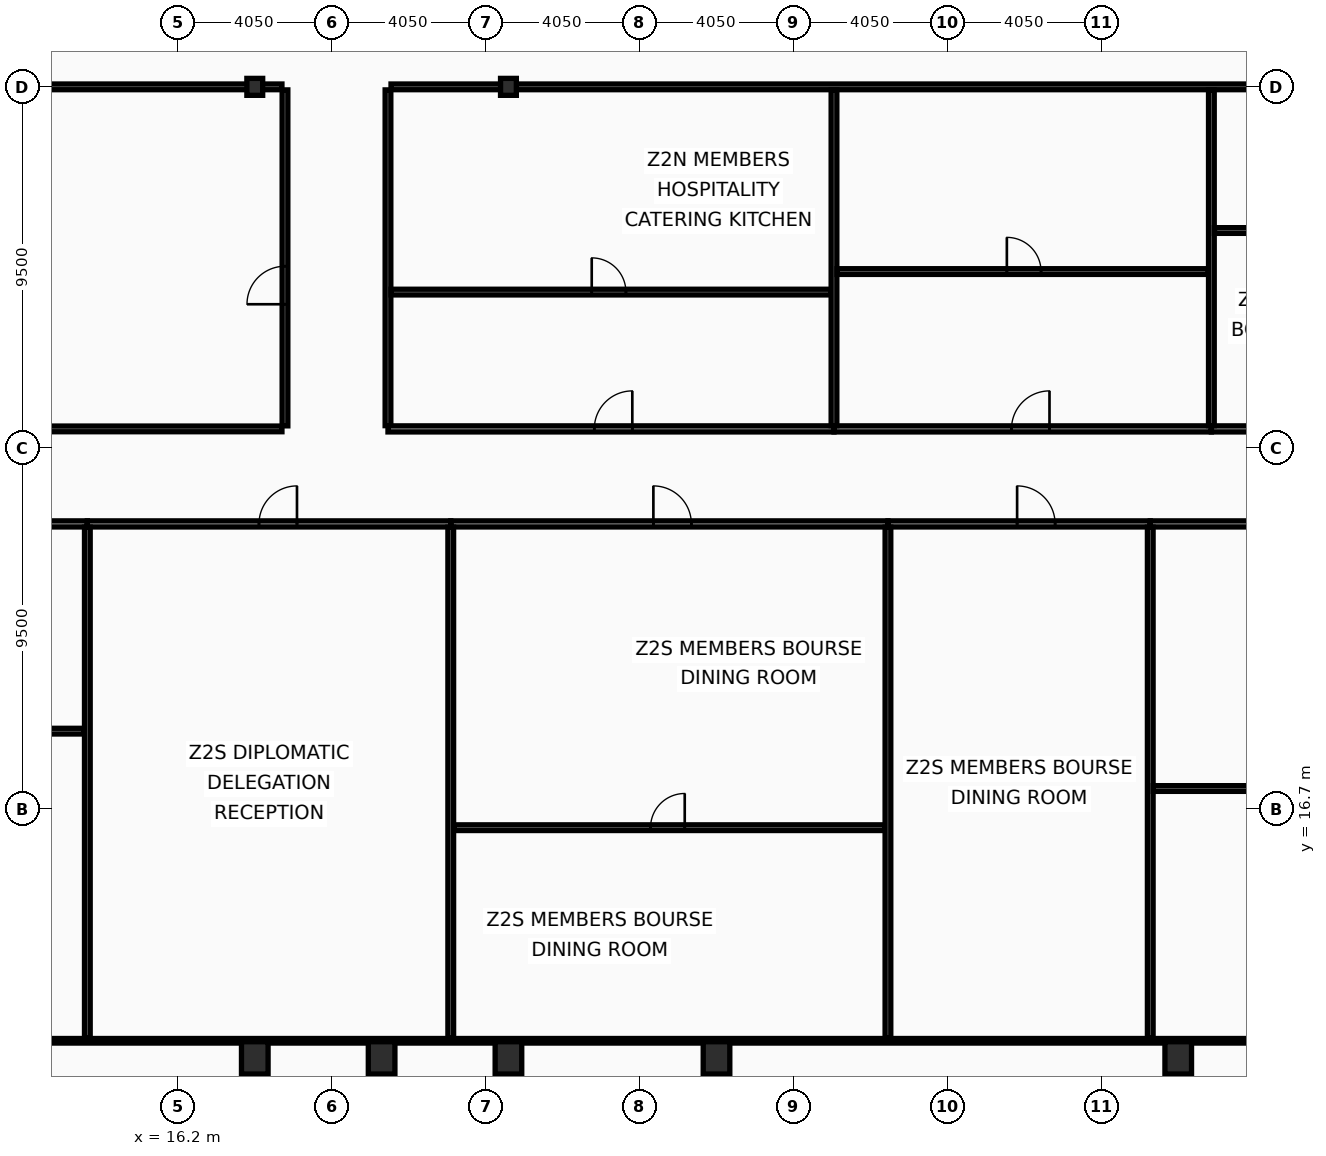
"""IFC4 building model, lengths in metres.
Left out: names, types, materials, properties, quantities, classifications, styles, units other than length and angle.
Written with IfcOpenShell. Run it as: python <this file> out.ifc"""

import sys

from ifc_helpers import new_model, si_unit, direction, frame, frame_2d, origin, origin_2d, place, context, subcontext, project, spatial, rectangle, hollow_rectangle, i_section, extrude, element, fill, save


model = new_model("IFC4")
c1 = context("Model", 3, precision=1e-05, world=origin(), true_north=direction((0.0, 1.0)))
c2 = subcontext(c1, "Body", "Model", "MODEL_VIEW")
j1 = project(units=[si_unit("LENGTHUNIT", "METRE"), si_unit("PLANEANGLEUNIT", "RADIAN")], contexts=[c1])
p1 = place(None, origin())
s1 = spatial("IfcSite", under=j1, at=p1, CompositionType="ELEMENT")
p2 = place(p1, origin())
s2 = spatial("IfcBuilding", under=s1, at=p2, CompositionType="ELEMENT")
p3 = place(p2, frame((0.0, 0.0, 136.2)))
s3 = spatial("IfcBuildingStorey", under=s2, at=p3, CompositionType="ELEMENT", Elevation=136.2)
for number, where, z_axis, x_axis in (
    (1, (18.225, 10.15, 0.0), (0.0, 0.0, 1.0), (1.0, 0.0, 0.0)),
    (2, (21.562, 10.15, 0.0), (0.0, 0.0, 1.0), (1.0, 0.0, 0.0)),
    (3, (24.9, 10.15, 0.0), (0.0, 0.0, 1.0), (1.0, 0.0, 0.0)),
    (4, (30.375, 10.15, 0.0), (0.0, 0.0, 1.0), (1.0, 0.0, 0.0)),
    (5, (42.525, 10.15, 0.0), (0.0, 0.0, 1.0), (1.0, 0.0, 0.0)),
):
    element("IfcColumn", number, at=place(p3, frame(where, z_axis=z_axis, x_axis=x_axis)), inside=s3, PredefinedType="COLUMN", context=c2, shape_type="SweptSolid", body=[
        extrude(hollow_rectangle(XDim=0.7, YDim=0.85, WallThickness=0.05, at=origin_2d()), origin(), (0.0, 0.0, 1.0), 3.6),
    ])
for number, where, z_axis, x_axis in (
    (6, (18.225, 35.7, 0.0), (0.0, 0.0, 1.0), (1.0, 0.0, 0.0)),
    (7, (24.9, 35.7, 0.0), (0.0, 0.0, 1.0), (1.0, 0.0, 0.0)),
):
    element("IfcColumn", number, at=place(p3, frame(where, z_axis=z_axis, x_axis=x_axis)), inside=s3, PredefinedType="COLUMN", context=c2, shape_type="SweptSolid", body=[
        extrude(i_section(OverallWidth=0.416, OverallDepth=0.446, WebThickness=0.039, FlangeThickness=0.063, at=origin_2d()), origin(), (0.0, 0.0, 1.0), 3.6),
    ])
p4 = place(p3, frame((6.03, 24.2, 0.0), z_axis=(0.0, 0.0, 1.0), x_axis=(1.0, 0.0, 0.0)))
e8 = element("IfcWall", 8, at=p4, inside=s3, PredefinedType="PARTITIONING", context=c2, shape_type="SweptSolid", body=[
    extrude(rectangle(XDim=7.789, YDim=0.16, at=frame_2d((3.895, 0.0))), origin(), (0.0, 0.0, 1.0), 3.44),
])
p5 = place(p4, frame((3.771, 0.0, 0.0)))
e9 = element("IfcOpeningElement", 9, at=p5, cuts=e8, PredefinedType="OPENING", context=c2, shape_type="SweptSolid", body=[
    extrude(rectangle(XDim=1.0, YDim=2.05, at=frame_2d((0.5, 1.025))), frame((0.0, 0.09, 0.0), z_axis=(0.0, -1.0, 0.0), x_axis=(1.0, 0.0, 0.0)), (0.0, 0.0, 1.0), 0.18),
])
p6 = place(p3, frame((6.095, 18.747, 0.0), z_axis=(0.0, 0.0, 1.0), x_axis=(1.0, 0.0, 0.0)))
e10 = element("IfcWall", 10, at=p6, inside=s3, PredefinedType="PARTITIONING", context=c2, shape_type="SweptSolid", body=[
    extrude(rectangle(XDim=7.644, YDim=0.15, at=frame_2d((3.822, 0.0))), origin(), (0.0, 0.0, 1.0), 2.73),
])
p7 = place(p6, frame((3.505, 0.0, 0.0)))
e11 = element("IfcOpeningElement", 11, at=p7, cuts=e10, PredefinedType="OPENING", context=c2, shape_type="SweptSolid", body=[
    extrude(rectangle(XDim=0.9, YDim=2.05, at=frame_2d((0.45, 1.025))), frame((0.0, 0.085, 0.0), z_axis=(0.0, -1.0, 0.0), x_axis=(1.0, 0.0, 0.0)), (0.0, 0.0, 1.0), 0.17),
])
p8 = place(p3, frame((13.819, 24.2, 0.0), z_axis=(0.0, 0.0, 1.0), x_axis=(1.0, 0.0, 0.0)))
e12 = element("IfcWall", 12, at=p8, inside=s3, PredefinedType="PARTITIONING", context=c2, shape_type="SweptSolid", body=[
    extrude(rectangle(XDim=9.563, YDim=0.16, at=frame_2d((4.781, 0.0))), origin(), (0.0, 0.0, 1.0), 2.73),
])
p9 = place(p8, frame((4.516, 0.0, 0.0)))
e13 = element("IfcOpeningElement", 13, at=p9, cuts=e12, PredefinedType="OPENING", context=c2, shape_type="SweptSolid", body=[
    extrude(rectangle(XDim=1.0, YDim=2.05, at=frame_2d((0.5, 1.025))), frame((0.0, 0.09, 0.0), z_axis=(0.0, -1.0, 0.0), x_axis=(1.0, 0.0, 0.0)), (0.0, 0.0, 1.0), 0.18),
])
p10 = place(p3, frame((13.819, 10.665, 0.0), z_axis=(0.0, 0.0, 1.0), x_axis=(0.0, 1.0, 0.0)))
e14 = element("IfcWall", 14, at=p10, inside=s3, PredefinedType="PARTITIONING", context=c2, shape_type="SweptSolid", body=[
    extrude(rectangle(XDim=13.45, YDim=0.15, at=frame_2d((6.725, 0.0))), origin(), (0.0, 0.0, 1.0), 2.73),
])
p11 = place(p3, frame((23.382, 24.2, 0.0), z_axis=(0.0, 0.0, 1.0), x_axis=(1.0, 0.0, 0.0)))
e15 = element("IfcWall", 15, at=p11, inside=s3, PredefinedType="PARTITIONING", context=c2, shape_type="SweptSolid", body=[
    extrude(rectangle(XDim=11.504, YDim=0.16, at=frame_2d((5.752, 0.0))), origin(), (0.0, 0.0, 1.0), 2.73),
])
p12 = place(p11, frame((5.332, 0.0, 0.0)))
e16 = element("IfcOpeningElement", 16, at=p12, cuts=e15, PredefinedType="OPENING", context=c2, shape_type="SweptSolid", body=[
    extrude(rectangle(XDim=1.0, YDim=2.05, at=frame_2d((0.5, 1.025))), frame((0.0, 0.09, 0.0), z_axis=(0.0, -1.0, 0.0), x_axis=(1.0, 0.0, 0.0)), (0.0, 0.0, 1.0), 0.18),
])
p13 = place(p3, frame((23.382, 10.665, 0.0), z_axis=(0.0, 0.0, 1.0), x_axis=(0.0, 1.0, 0.0)))
e17 = element("IfcWall", 17, at=p13, inside=s3, PredefinedType="PARTITIONING", context=c2, shape_type="SweptSolid", body=[
    extrude(rectangle(XDim=13.45, YDim=0.15, at=frame_2d((6.725, 0.0))), origin(), (0.0, 0.0, 1.0), 2.93),
])
p14 = place(p3, frame((23.462, 16.207, 0.0), z_axis=(0.0, 0.0, 1.0), x_axis=(1.0, 0.0, 0.0)))
e18 = element("IfcWall", 18, at=p14, inside=s3, PredefinedType="PARTITIONING", context=c2, shape_type="SweptSolid", body=[
    extrude(rectangle(XDim=11.344, YDim=0.15, at=frame_2d((5.672, 0.0))), origin(), (0.0, 0.0, 1.0), 2.73),
])
p15 = place(p14, frame((5.177, 0.0, 0.0)))
e19 = element("IfcOpeningElement", 19, at=p15, cuts=e18, PredefinedType="OPENING", context=c2, shape_type="SweptSolid", body=[
    extrude(rectangle(XDim=0.9, YDim=2.05, at=frame_2d((0.45, 1.025))), frame((0.0, 0.085, 0.0), z_axis=(0.0, -1.0, 0.0), x_axis=(1.0, 0.0, 0.0)), (0.0, 0.0, 1.0), 0.17),
])
p16 = place(p3, frame((34.886, 24.2, 0.0), z_axis=(0.0, 0.0, 1.0), x_axis=(1.0, 0.0, 0.0)))
e20 = element("IfcWall", 20, at=p16, inside=s3, PredefinedType="PARTITIONING", context=c2, shape_type="SweptSolid", body=[
    extrude(rectangle(XDim=6.902, YDim=0.16, at=frame_2d((3.451, 0.0))), origin(), (0.0, 0.0, 1.0), 3.44),
])
p17 = place(p16, frame((3.399, 0.0, 0.0)))
e21 = element("IfcOpeningElement", 21, at=p17, cuts=e20, PredefinedType="OPENING", context=c2, shape_type="SweptSolid", body=[
    extrude(rectangle(XDim=1.0, YDim=2.05, at=frame_2d((0.5, 1.025))), frame((0.0, 0.09, 0.0), z_axis=(0.0, -1.0, 0.0), x_axis=(1.0, 0.0, 0.0)), (0.0, 0.0, 1.0), 0.18),
])
p18 = place(p3, frame((34.886, 10.665, 0.0), z_axis=(0.0, 0.0, 1.0), x_axis=(0.0, 1.0, 0.0)))
e22 = element("IfcWall", 22, at=p18, inside=s3, PredefinedType="PARTITIONING", context=c2, shape_type="SweptSolid", body=[
    extrude(rectangle(XDim=13.45, YDim=0.15, at=frame_2d((6.725, 0.0))), origin(), (0.0, 0.0, 1.0), 2.93),
])
p19 = place(p3, frame((41.789, 24.2, 0.0), z_axis=(0.0, 0.0, 1.0), x_axis=(1.0, 0.0, 0.0)))
e23 = element("IfcWall", 23, at=p19, inside=s3, PredefinedType="PARTITIONING", context=c2, shape_type="SweptSolid", body=[
    extrude(rectangle(XDim=7.214, YDim=0.16, at=frame_2d((3.607, 0.0))), origin(), (0.0, 0.0, 1.0), 2.73),
])
p20 = place(p19, frame((3.53, 0.0, 0.0)))
e24 = element("IfcOpeningElement", 24, at=p20, cuts=e23, PredefinedType="OPENING", context=c2, shape_type="SweptSolid", body=[
    extrude(rectangle(XDim=1.0, YDim=2.05, at=frame_2d((0.5, 1.025))), frame((0.0, 0.09, 0.0), z_axis=(0.0, -1.0, 0.0), x_axis=(1.0, 0.0, 0.0)), (0.0, 0.0, 1.0), 0.18),
])
p21 = place(p3, frame((41.789, 10.665, 0.0), z_axis=(0.0, 0.0, 1.0), x_axis=(0.0, 1.0, 0.0)))
e25 = element("IfcWall", 25, at=p21, inside=s3, PredefinedType="PARTITIONING", context=c2, shape_type="SweptSolid", body=[
    extrude(rectangle(XDim=13.45, YDim=0.15, at=frame_2d((6.725, 0.0))), origin(), (0.0, 0.0, 1.0), 2.93),
])
p22 = place(p3, frame((41.869, 17.238, 0.0), z_axis=(0.0, 0.0, 1.0), x_axis=(1.0, 0.0, 0.0)))
e26 = element("IfcWall", 26, at=p22, inside=s3, PredefinedType="PARTITIONING", context=c2, shape_type="SweptSolid", body=[
    extrude(rectangle(XDim=7.054, YDim=0.15, at=frame_2d((3.527, 0.0))), origin(), (0.0, 0.0, 1.0), 2.73),
])
p23 = place(p22, frame((3.246, 0.0, 0.0)))
e27 = element("IfcOpeningElement", 27, at=p23, cuts=e26, PredefinedType="OPENING", context=c2, shape_type="SweptSolid", body=[
    extrude(rectangle(XDim=0.9, YDim=2.05, at=frame_2d((0.45, 1.025))), frame((0.0, 0.085, 0.0), z_axis=(0.0, -1.0, 0.0), x_axis=(1.0, 0.0, 0.0)), (0.0, 0.0, 1.0), 0.17),
])
p24 = place(p3, frame((19.02, 26.78, 0.0), z_axis=(0.0, 0.0, 1.0), x_axis=(0.0, 1.0, 0.0)))
e28 = element("IfcWall", 28, at=p24, inside=s3, PredefinedType="PARTITIONING", context=c2, shape_type="SweptSolid", body=[
    extrude(rectangle(XDim=8.84, YDim=0.15, at=frame_2d((4.42, 0.0))), origin(), (0.0, 0.0, 1.0), 2.93),
])
p25 = place(p24, frame((3.2, 0.0, 0.0)))
e29 = element("IfcOpeningElement", 29, at=p25, cuts=e28, PredefinedType="OPENING", context=c2, shape_type="SweptSolid", body=[
    extrude(rectangle(XDim=1.0, YDim=2.05, at=frame_2d((0.5, 1.025))), frame((0.0, 0.085, 0.0), z_axis=(0.0, -1.0, 0.0), x_axis=(1.0, 0.0, 0.0)), (0.0, 0.0, 1.0), 0.17),
])
for number, where, z_axis, x_axis in (
    (30, (6.095, 26.7, 0.0), (0.0, 0.0, 1.0), (1.0, 0.0, 0.0)),
    (31, (6.095, 35.7, 0.0), (0.0, 0.0, 1.0), (1.0, 0.0, 0.0)),
):
    element("IfcWall", number, at=place(p3, frame(where, z_axis=z_axis, x_axis=x_axis)), inside=s3, PredefinedType="PARTITIONING", context=c2, shape_type="SweptSolid", body=[
        extrude(rectangle(XDim=12.845, YDim=0.15, at=frame_2d((6.422, 0.0))), origin(), (0.0, 0.0, 1.0), 2.73),
    ])
p26 = place(p3, frame((21.73, 26.785, 0.0), z_axis=(0.0, 0.0, 1.0), x_axis=(0.0, 1.0, 0.0)))
e32 = element("IfcWall", 32, at=p26, inside=s3, PredefinedType="PARTITIONING", context=c2, shape_type="SweptSolid", body=[
    extrude(rectangle(XDim=8.835, YDim=0.15, at=frame_2d((4.417, 0.0))), origin(), (0.0, 0.0, 1.0), 2.93),
])
p27 = place(p3, frame((21.81, 35.7, 0.0), z_axis=(0.0, 0.0, 1.0), x_axis=(1.0, 0.0, 0.0)))
e33 = element("IfcWall", 33, at=p27, inside=s3, PredefinedType="PARTITIONING", context=c2, shape_type="SweptSolid", body=[
    extrude(rectangle(XDim=44.995, YDim=0.15, at=frame_2d((22.498, 0.0))), origin(), (0.0, 0.0, 1.0), 2.73),
])
p28 = place(p3, frame((21.73, 26.7, 0.0), z_axis=(0.0, 0.0, 1.0), x_axis=(1.0, 0.0, 0.0)))
e34 = element("IfcWall", 34, at=p28, inside=s3, PredefinedType="PARTITIONING", context=c2, shape_type="SweptSolid", body=[
    extrude(rectangle(XDim=11.736, YDim=0.16, at=frame_2d((5.868, 0.0))), origin(), (0.0, 0.0, 1.0), 2.73),
])
p29 = place(p28, frame((5.429, 0.0, 0.0)))
e35 = element("IfcOpeningElement", 35, at=p29, cuts=e34, PredefinedType="OPENING", context=c2, shape_type="SweptSolid", body=[
    extrude(rectangle(XDim=1.0, YDim=2.05, at=frame_2d((0.5, 1.025))), frame((0.0, 0.09, 0.0), z_axis=(0.0, -1.0, 0.0), x_axis=(1.0, 0.0, 0.0)), (0.0, 0.0, 1.0), 0.18),
])
p30 = place(p3, frame((21.81, 30.3, 0.0), z_axis=(0.0, 0.0, 1.0), x_axis=(1.0, 0.0, 0.0)))
e36 = element("IfcWall", 36, at=p30, inside=s3, PredefinedType="PARTITIONING", context=c2, shape_type="SweptSolid", body=[
    extrude(rectangle(XDim=11.576, YDim=0.15, at=frame_2d((5.788, 0.0))), origin(), (0.0, 0.0, 1.0), 2.73),
])
p31 = place(p30, frame((5.281, 0.0, 0.0)))
e37 = element("IfcOpeningElement", 37, at=p31, cuts=e36, PredefinedType="OPENING", context=c2, shape_type="SweptSolid", body=[
    extrude(rectangle(XDim=0.9, YDim=2.05, at=frame_2d((0.45, 1.025))), frame((0.0, 0.085, 0.0), z_axis=(0.0, -1.0, 0.0), x_axis=(1.0, 0.0, 0.0)), (0.0, 0.0, 1.0), 0.17),
])
p32 = place(p3, frame((33.466, 26.7, 0.0), z_axis=(0.0, 0.0, 1.0), x_axis=(1.0, 0.0, 0.0)))
e38 = element("IfcWall", 38, at=p32, inside=s3, PredefinedType="PARTITIONING", context=c2, shape_type="SweptSolid", body=[
    extrude(rectangle(XDim=9.931, YDim=0.16, at=frame_2d((4.965, 0.0))), origin(), (0.0, 0.0, 1.0), 2.73),
])
p33 = place(p32, frame((4.671, 0.0, 0.0)))
e39 = element("IfcOpeningElement", 39, at=p33, cuts=e38, PredefinedType="OPENING", context=c2, shape_type="SweptSolid", body=[
    extrude(rectangle(XDim=1.0, YDim=2.05, at=frame_2d((0.5, 1.025))), frame((0.0, 0.09, 0.0), z_axis=(0.0, -1.0, 0.0), x_axis=(1.0, 0.0, 0.0)), (0.0, 0.0, 1.0), 0.18),
])
p34 = place(p3, frame((33.466, 26.785, 0.0), z_axis=(0.0, 0.0, 1.0), x_axis=(0.0, 1.0, 0.0)))
e40 = element("IfcWall", 40, at=p34, inside=s3, PredefinedType="PARTITIONING", context=c2, shape_type="SweptSolid", body=[
    extrude(rectangle(XDim=8.835, YDim=0.15, at=frame_2d((4.417, 0.0))), origin(), (0.0, 0.0, 1.0), 2.93),
])
p35 = place(p3, frame((33.546, 30.84, 0.0), z_axis=(0.0, 0.0, 1.0), x_axis=(1.0, 0.0, 0.0)))
e41 = element("IfcWall", 41, at=p35, inside=s3, PredefinedType="PARTITIONING", context=c2, shape_type="SweptSolid", body=[
    extrude(rectangle(XDim=9.771, YDim=0.15, at=frame_2d((4.885, 0.0))), origin(), (0.0, 0.0, 1.0), 2.73),
])
p36 = place(p35, frame((4.469, 0.0, 0.0)))
e42 = element("IfcOpeningElement", 42, at=p36, cuts=e41, PredefinedType="OPENING", context=c2, shape_type="SweptSolid", body=[
    extrude(rectangle(XDim=0.9, YDim=2.05, at=frame_2d((0.45, 1.025))), frame((0.0, 0.085, 0.0), z_axis=(0.0, -1.0, 0.0), x_axis=(1.0, 0.0, 0.0)), (0.0, 0.0, 1.0), 0.17),
])
p37 = place(p3, frame((43.397, 26.7, 0.0), z_axis=(0.0, 0.0, 1.0), x_axis=(1.0, 0.0, 0.0)))
e43 = element("IfcWall", 43, at=p37, inside=s3, PredefinedType="PARTITIONING", context=c2, shape_type="SweptSolid", body=[
    extrude(rectangle(XDim=10.833, YDim=0.16, at=frame_2d((5.417, 0.0))), origin(), (0.0, 0.0, 1.0), 2.73),
])
p38 = place(p37, frame((5.05, 0.0, 0.0)))
e44 = element("IfcOpeningElement", 44, at=p38, cuts=e43, PredefinedType="OPENING", context=c2, shape_type="SweptSolid", body=[
    extrude(rectangle(XDim=1.0, YDim=2.05, at=frame_2d((0.5, 1.025))), frame((0.0, 0.09, 0.0), z_axis=(0.0, -1.0, 0.0), x_axis=(1.0, 0.0, 0.0)), (0.0, 0.0, 1.0), 0.18),
])
p39 = place(p3, frame((43.397, 26.785, 0.0), z_axis=(0.0, 0.0, 1.0), x_axis=(0.0, 1.0, 0.0)))
e45 = element("IfcWall", 45, at=p39, inside=s3, PredefinedType="PARTITIONING", context=c2, shape_type="SweptSolid", body=[
    extrude(rectangle(XDim=8.835, YDim=0.15, at=frame_2d((4.417, 0.0))), origin(), (0.0, 0.0, 1.0), 2.93),
])
p40 = place(p3, frame((43.477, 31.92, 0.0), z_axis=(0.0, 0.0, 1.0), x_axis=(1.0, 0.0, 0.0)))
e46 = element("IfcWall", 46, at=p40, inside=s3, PredefinedType="PARTITIONING", context=c2, shape_type="SweptSolid", body=[
    extrude(rectangle(XDim=10.674, YDim=0.15, at=frame_2d((5.337, 0.0))), origin(), (0.0, 0.0, 1.0), 2.73),
])
p41 = place(p40, frame((4.875, 0.0, 0.0)))
e47 = element("IfcOpeningElement", 47, at=p41, cuts=e46, PredefinedType="OPENING", context=c2, shape_type="SweptSolid", body=[
    extrude(rectangle(XDim=0.9, YDim=2.05, at=frame_2d((0.45, 1.025))), frame((0.0, 0.085, 0.0), z_axis=(0.0, -1.0, 0.0), x_axis=(1.0, 0.0, 0.0)), (0.0, 0.0, 1.0), 0.17),
])
p42 = place(p3, frame((6.095, 10.6, 0.0), z_axis=(0.0, 0.0, 1.0), x_axis=(1.0, 0.0, 0.0)))
e48 = element("IfcWall", 48, at=p42, inside=s3, PredefinedType="PARTITIONING", context=c2, shape_type="SweptSolid", body=[
    extrude(rectangle(XDim=60.71, YDim=0.12, at=frame_2d((30.355, 0.0))), origin(), (0.0, 0.0, 1.0), 2.73),
])
p43 = place(p9, origin())
e49 = element("IfcDoor", 49, at=p43, inside=s3, OperationType="SINGLE_SWING_RIGHT", PredefinedType="DOOR", context=c2, shape_type="SweptSolid", body=[
    extrude(rectangle(XDim=1.0, YDim=2.05, at=frame_2d((0.5, 1.025))), frame((0.0, 0.025, 0.0), z_axis=(0.0, -1.0, 0.0), x_axis=(1.0, 0.0, 0.0)), (0.0, 0.0, 1.0), 0.05),
])
fill(e13, e49)
p44 = place(p12, origin())
e50 = element("IfcDoor", 50, at=p44, inside=s3, OperationType="SINGLE_SWING_LEFT", PredefinedType="DOOR", context=c2, shape_type="SweptSolid", body=[
    extrude(rectangle(XDim=1.0, YDim=2.05, at=frame_2d((0.5, 1.025))), frame((0.0, 0.025, 0.0), z_axis=(0.0, -1.0, 0.0), x_axis=(1.0, 0.0, 0.0)), (0.0, 0.0, 1.0), 0.05),
])
fill(e16, e50)
p45 = place(p15, origin())
e51 = element("IfcDoor", 51, at=p45, inside=s3, OperationType="SINGLE_SWING_RIGHT", PredefinedType="DOOR", context=c2, shape_type="SweptSolid", body=[
    extrude(rectangle(XDim=0.9, YDim=2.05, at=frame_2d((0.45, 1.025))), frame((0.0, 0.025, 0.0), z_axis=(0.0, -1.0, 0.0), x_axis=(1.0, 0.0, 0.0)), (0.0, 0.0, 1.0), 0.05),
])
fill(e19, e51)
p46 = place(p17, origin())
e52 = element("IfcDoor", 52, at=p46, inside=s3, OperationType="SINGLE_SWING_LEFT", PredefinedType="DOOR", context=c2, shape_type="SweptSolid", body=[
    extrude(rectangle(XDim=1.0, YDim=2.05, at=frame_2d((0.5, 1.025))), frame((0.0, 0.025, 0.0), z_axis=(0.0, -1.0, 0.0), x_axis=(1.0, 0.0, 0.0)), (0.0, 0.0, 1.0), 0.05),
])
fill(e21, e52)
p47 = place(p25, origin())
e53 = element("IfcDoor", 53, at=p47, inside=s3, OperationType="SINGLE_SWING_LEFT", PredefinedType="DOOR", context=c2, shape_type="SweptSolid", body=[
    extrude(rectangle(XDim=1.0, YDim=2.05, at=frame_2d((0.5, 1.025))), frame((0.0, 0.025, 0.0), z_axis=(0.0, -1.0, 0.0), x_axis=(1.0, 0.0, 0.0)), (0.0, 0.0, 1.0), 0.05),
])
fill(e29, e53)
p48 = place(p29, origin())
e54 = element("IfcDoor", 54, at=p48, inside=s3, OperationType="SINGLE_SWING_RIGHT", PredefinedType="DOOR", context=c2, shape_type="SweptSolid", body=[
    extrude(rectangle(XDim=1.0, YDim=2.05, at=frame_2d((0.5, 1.025))), frame((0.0, 0.025, 0.0), z_axis=(0.0, -1.0, 0.0), x_axis=(1.0, 0.0, 0.0)), (0.0, 0.0, 1.0), 0.05),
])
fill(e35, e54)
p49 = place(p31, origin())
e55 = element("IfcDoor", 55, at=p49, inside=s3, OperationType="SINGLE_SWING_LEFT", PredefinedType="DOOR", context=c2, shape_type="SweptSolid", body=[
    extrude(rectangle(XDim=0.9, YDim=2.05, at=frame_2d((0.45, 1.025))), frame((0.0, 0.025, 0.0), z_axis=(0.0, -1.0, 0.0), x_axis=(1.0, 0.0, 0.0)), (0.0, 0.0, 1.0), 0.05),
])
fill(e37, e55)
p50 = place(p33, origin())
e56 = element("IfcDoor", 56, at=p50, inside=s3, OperationType="SINGLE_SWING_RIGHT", PredefinedType="DOOR", context=c2, shape_type="SweptSolid", body=[
    extrude(rectangle(XDim=1.0, YDim=2.05, at=frame_2d((0.5, 1.025))), frame((0.0, 0.025, 0.0), z_axis=(0.0, -1.0, 0.0), x_axis=(1.0, 0.0, 0.0)), (0.0, 0.0, 1.0), 0.05),
])
fill(e39, e56)
p51 = place(p36, origin())
e57 = element("IfcDoor", 57, at=p51, inside=s3, OperationType="SINGLE_SWING_LEFT", PredefinedType="DOOR", context=c2, shape_type="SweptSolid", body=[
    extrude(rectangle(XDim=0.9, YDim=2.05, at=frame_2d((0.45, 1.025))), frame((0.0, 0.025, 0.0), z_axis=(0.0, -1.0, 0.0), x_axis=(1.0, 0.0, 0.0)), (0.0, 0.0, 1.0), 0.05),
])
fill(e42, e57)
save(model, sys.argv[1])
